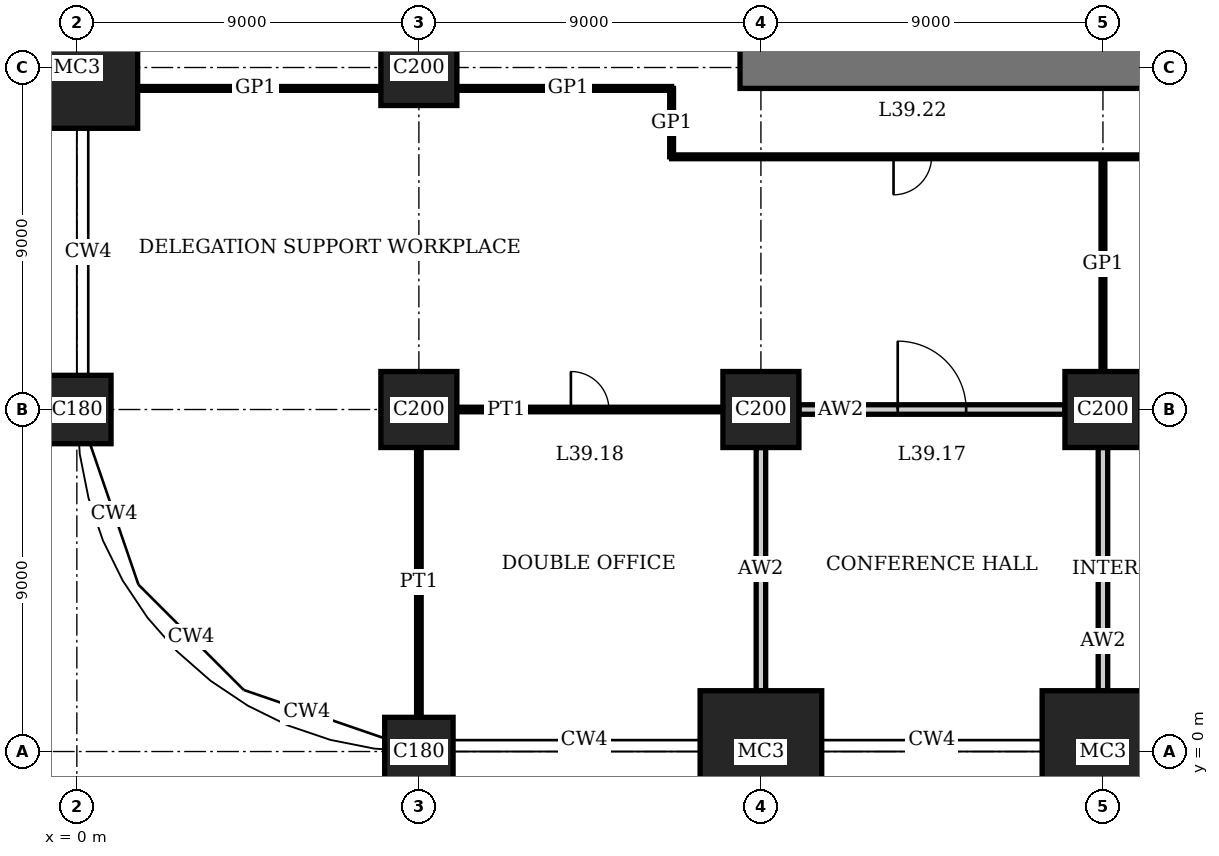
"""IFC4 building model, lengths in metres.
Left out: names, types, materials, properties, quantities, classifications, styles, units other than length and angle.
Written with IfcOpenShell. Run it as: python <this file> out.ifc"""

import sys

from ifc_helpers import new_model, si_unit, direction, frame, frame_2d, origin, origin_2d, place, context, subcontext, project, spatial, rectangle, extrude, element, fill, save


model = new_model("IFC4")
c1 = context("Model", 3, precision=1e-05, world=origin(), true_north=direction((0.0, 1.0)))
c2 = subcontext(c1, "Body", "Model", "MODEL_VIEW")
j1 = project(units=[si_unit("LENGTHUNIT", "METRE"), si_unit("PLANEANGLEUNIT", "RADIAN")], contexts=[c1])
p1 = place(None, origin())
s1 = spatial("IfcSite", under=j1, at=p1, CompositionType="ELEMENT")
p2 = place(p1, origin())
s2 = spatial("IfcBuilding", under=s1, at=p2, CompositionType="ELEMENT")
p3 = place(p2, frame((0.0, 0.0, 162.2)))
s3 = spatial("IfcBuildingStorey", under=s2, at=p3, CompositionType="ELEMENT", Elevation=162.2)
p4 = place(p3, frame((0.0, 9.0, 0.0), z_axis=(0.0, 0.0, 1.0), x_axis=(1.0, 0.0, 0.0)))
e1 = element("IfcColumn", 1, at=p4, inside=s3, PredefinedType="COLUMN", context=c2, shape_type="SweptSolid", body=[
    extrude(rectangle(XDim=1.8, YDim=1.8, at=origin_2d()), origin(), (0.0, 0.0, 1.0), 4.0),
])
p5 = place(p3, frame((0.0, 18.0, 0.0), z_axis=(0.0, 0.0, 1.0), x_axis=(1.0, 0.0, 0.0)))
e2 = element("IfcColumn", 2, at=p5, inside=s3, PredefinedType="COLUMN", context=c2, shape_type="SweptSolid", body=[
    extrude(rectangle(XDim=3.2, YDim=3.2, at=origin_2d()), origin(), (0.0, 0.0, 1.0), 4.0),
])
p6 = place(p3, frame((9.0, 0.0, 0.0), z_axis=(0.0, 0.0, 1.0), x_axis=(1.0, 0.0, 0.0)))
e3 = element("IfcColumn", 3, at=p6, inside=s3, PredefinedType="COLUMN", context=c2, shape_type="SweptSolid", body=[
    extrude(rectangle(XDim=1.8, YDim=1.8, at=origin_2d()), origin(), (0.0, 0.0, 1.0), 4.0),
])
for number, where, z_axis, x_axis in (
    (4, (9.0, 9.0, 0.0), (0.0, 0.0, 1.0), (1.0, 0.0, 0.0)),
    (5, (9.0, 18.0, 0.0), (0.0, 0.0, 1.0), (1.0, 0.0, 0.0)),
):
    element("IfcColumn", number, at=place(p3, frame(where, z_axis=z_axis, x_axis=x_axis)), inside=s3, PredefinedType="COLUMN", context=c2, shape_type="SweptSolid", body=[
        extrude(rectangle(XDim=2.0, YDim=2.0, at=origin_2d()), origin(), (0.0, 0.0, 1.0), 4.0),
    ])
p7 = place(p3, frame((18.0, 0.0, 0.0), z_axis=(0.0, 0.0, 1.0), x_axis=(1.0, 0.0, 0.0)))
e6 = element("IfcColumn", 6, at=p7, inside=s3, PredefinedType="COLUMN", context=c2, shape_type="SweptSolid", body=[
    extrude(rectangle(XDim=3.2, YDim=3.2, at=origin_2d()), origin(), (0.0, 0.0, 1.0), 4.0),
])
p8 = place(p3, frame((18.0, 9.0, 0.0), z_axis=(0.0, 0.0, 1.0), x_axis=(1.0, 0.0, 0.0)))
e7 = element("IfcColumn", 7, at=p8, inside=s3, PredefinedType="COLUMN", context=c2, shape_type="SweptSolid", body=[
    extrude(rectangle(XDim=2.0, YDim=2.0, at=origin_2d()), origin(), (0.0, 0.0, 1.0), 4.0),
])
p9 = place(p3, frame((27.0, 0.0, 0.0), z_axis=(0.0, 0.0, 1.0), x_axis=(1.0, 0.0, 0.0)))
e8 = element("IfcColumn", 8, at=p9, inside=s3, PredefinedType="COLUMN", context=c2, shape_type="SweptSolid", body=[
    extrude(rectangle(XDim=3.2, YDim=3.2, at=origin_2d()), origin(), (0.0, 0.0, 1.0), 4.0),
])
p10 = place(p3, frame((27.0, 9.0, 0.0), z_axis=(0.0, 0.0, 1.0), x_axis=(1.0, 0.0, 0.0)))
e9 = element("IfcColumn", 9, at=p10, inside=s3, PredefinedType="COLUMN", context=c2, shape_type="SweptSolid", body=[
    extrude(rectangle(XDim=2.0, YDim=2.0, at=origin_2d()), origin(), (0.0, 0.0, 1.0), 4.0),
])
p11 = place(p3, frame((17.45, 18.0, 0.0), z_axis=(0.0, 0.0, 1.0), x_axis=(1.0, 0.0, 0.0)))
e10 = element("IfcWall", 10, at=p11, inside=s3, PredefinedType="SHEAR", context=c2, shape_type="SweptSolid", body=[
    extrude(rectangle(XDim=28.1, YDim=1.1, at=frame_2d((14.05, 0.0))), origin(), (0.0, 0.0, 1.0), 4.0),
])
p12 = place(p11, frame((11.55, 0.0, 0.0)))
e11 = element("IfcOpeningElement", 11, at=p12, cuts=e10, PredefinedType="OPENING", context=c2, shape_type="SweptSolid", body=[
    extrude(rectangle(XDim=1.0, YDim=2.4, at=frame_2d((0.5, 1.2))), frame((0.0, 0.56, 0.0), z_axis=(0.0, -1.0, 0.0), x_axis=(1.0, 0.0, 0.0)), (0.0, 0.0, 1.0), 1.12),
])
p13 = place(p11, frame((16.55, 0.0, 0.0)))
e12 = element("IfcOpeningElement", 12, at=p13, cuts=e10, PredefinedType="OPENING", context=c2, shape_type="SweptSolid", body=[
    extrude(rectangle(XDim=1.0, YDim=2.4, at=frame_2d((0.5, 1.2))), frame((0.0, 0.56, 0.0), z_axis=(0.0, -1.0, 0.0), x_axis=(1.0, 0.0, 0.0)), (0.0, 0.0, 1.0), 1.12),
])
p14 = place(p11, frame((20.0, 0.0, 0.0)))
e13 = element("IfcOpeningElement", 13, at=p14, cuts=e10, PredefinedType="OPENING", context=c2, shape_type="SweptSolid", body=[
    extrude(rectangle(XDim=1.1, YDim=2.4, at=frame_2d((0.55, 1.2))), frame((0.0, 0.56, 0.0), z_axis=(0.0, -1.0, 0.0), x_axis=(1.0, 0.0, 0.0)), (0.0, 0.0, 1.0), 1.12),
])
p15 = place(p11, frame((24.05, 0.0, 0.0)))
e14 = element("IfcOpeningElement", 14, at=p15, cuts=e10, PredefinedType="OPENING", context=c2, shape_type="SweptSolid", body=[
    extrude(rectangle(XDim=1.0, YDim=2.4, at=frame_2d((0.5, 1.2))), frame((0.0, 0.56, 0.0), z_axis=(0.0, -1.0, 0.0), x_axis=(1.0, 0.0, 0.0)), (0.0, 0.0, 1.0), 1.12),
])
p16 = place(p3, frame((19.0, 9.0, 0.0), z_axis=(0.0, 0.0, 1.0), x_axis=(1.0, 0.0, 0.0)))
e15 = element("IfcWall", 15, at=p16, inside=s3, PredefinedType="PARTITIONING", context=c2, shape_type="SweptSolid", body=[
    extrude(rectangle(XDim=7.0, YDim=0.25, at=frame_2d((3.5, 0.0))), origin(), (0.0, 0.0, 1.0), 3.05),
])
p17 = place(p16, frame((2.6, 0.0, 0.0)))
e16 = element("IfcOpeningElement", 16, at=p17, cuts=e15, PredefinedType="OPENING", context=c2, shape_type="SweptSolid", body=[
    extrude(rectangle(XDim=1.8, YDim=2.4, at=frame_2d((0.9, 1.2))), frame((0.0, 0.135, 0.0), z_axis=(0.0, -1.0, 0.0), x_axis=(1.0, 0.0, 0.0)), (0.0, 0.0, 1.0), 0.27),
])
p18 = place(p3, frame((10.0, 9.0, 0.0), z_axis=(0.0, 0.0, 1.0), x_axis=(1.0, 0.0, 0.0)))
e17 = element("IfcWall", 17, at=p18, inside=s3, PredefinedType="PARTITIONING", context=c2, shape_type="SweptSolid", body=[
    extrude(rectangle(XDim=7.0, YDim=0.12, at=frame_2d((3.5, 0.0))), origin(), (0.0, 0.0, 1.0), 3.05),
])
p19 = place(p18, frame((3.0, 0.0, 0.0)))
e18 = element("IfcOpeningElement", 18, at=p19, cuts=e17, PredefinedType="OPENING", context=c2, shape_type="SweptSolid", body=[
    extrude(rectangle(XDim=1.0, YDim=2.4, at=frame_2d((0.5, 1.2))), frame((0.0, 0.07, 0.0), z_axis=(0.0, -1.0, 0.0), x_axis=(1.0, 0.0, 0.0)), (0.0, 0.0, 1.0), 0.14),
])
p20 = place(p3, frame((15.65, 15.65, 0.0), z_axis=(0.0, 0.0, 1.0), x_axis=(1.0, 0.0, 0.0)))
e19 = element("IfcWall", 19, at=p20, inside=s3, PredefinedType="PARTITIONING", context=c2, shape_type="SweptSolid", body=[
    extrude(rectangle(XDim=31.7, YDim=0.1, at=frame_2d((15.85, 0.0))), origin(), (0.0, 0.0, 1.0), 3.75),
])
p21 = place(p20, frame((5.84, 0.0, 0.0)))
e20 = element("IfcOpeningElement", 20, at=p21, cuts=e19, PredefinedType="OPENING", context=c2, shape_type="SweptSolid", body=[
    extrude(rectangle(XDim=1.0, YDim=2.4, at=frame_2d((0.5, 1.2))), frame((0.0, 0.06, 0.0), z_axis=(0.0, -1.0, 0.0), x_axis=(1.0, 0.0, 0.0)), (0.0, 0.0, 1.0), 0.12),
])
p22 = place(p20, frame((15.35, 0.0, 0.0)))
e21 = element("IfcOpeningElement", 21, at=p22, cuts=e19, PredefinedType="OPENING", context=c2, shape_type="SweptSolid", body=[
    extrude(rectangle(XDim=1.0, YDim=2.4, at=frame_2d((0.5, 1.2))), frame((0.0, 0.06, 0.0), z_axis=(0.0, -1.0, 0.0), x_axis=(1.0, 0.0, 0.0)), (0.0, 0.0, 1.0), 0.12),
])
p23 = place(p3, frame((1.6, 17.45, 0.0), z_axis=(0.0, 0.0, 1.0), x_axis=(1.0, 0.0, 0.0)))
e22 = element("IfcWall", 22, at=p23, inside=s3, PredefinedType="PARTITIONING", context=c2, shape_type="SweptSolid", body=[
    extrude(rectangle(XDim=6.4, YDim=0.1, at=frame_2d((3.2, 0.0))), origin(), (0.0, 0.0, 1.0), 3.05),
])
p24 = place(p3, frame((10.0, 17.45, 0.0), z_axis=(0.0, 0.0, 1.0), x_axis=(1.0, 0.0, 0.0)))
e23 = element("IfcWall", 23, at=p24, inside=s3, PredefinedType="PARTITIONING", context=c2, shape_type="SweptSolid", body=[
    extrude(rectangle(XDim=5.65, YDim=0.1, at=frame_2d((2.825, 0.0))), origin(), (0.0, 0.0, 1.0), 3.05),
])
p25 = place(p3, frame((9.0, 0.9, 0.0), z_axis=(0.0, 0.0, 1.0), x_axis=(0.0, 1.0, 0.0)))
e24 = element("IfcWall", 24, at=p25, inside=s3, PredefinedType="PARTITIONING", context=c2, shape_type="SweptSolid", body=[
    extrude(rectangle(XDim=7.1, YDim=0.12, at=frame_2d((3.55, 0.0))), origin(), (0.0, 0.0, 1.0), 3.05),
])
p26 = place(p3, frame((15.65, 15.65, 0.0), z_axis=(0.0, 0.0, 1.0), x_axis=(0.0, 1.0, 0.0)))
e25 = element("IfcWall", 25, at=p26, inside=s3, PredefinedType="PARTITIONING", context=c2, shape_type="SweptSolid", body=[
    extrude(rectangle(XDim=1.8, YDim=0.1, at=frame_2d((0.9, 0.0))), origin(), (0.0, 0.0, 1.0), 3.75),
])
for number, where, z_axis, x_axis in (
    (26, (18.0, 1.6, 0.0), (0.0, 0.0, 1.0), (0.0, 1.0, 0.0)),
    (27, (27.0, 1.6, 0.0), (0.0, 0.0, 1.0), (0.0, 1.0, 0.0)),
):
    element("IfcWall", number, at=place(p3, frame(where, z_axis=z_axis, x_axis=x_axis)), inside=s3, PredefinedType="PARTITIONING", context=c2, shape_type="SweptSolid", body=[
        extrude(rectangle(XDim=6.4, YDim=0.25, at=frame_2d((3.2, 0.0))), origin(), (0.0, 0.0, 1.0), 3.05),
    ])
p27 = place(p3, frame((27.0, 10.0, 0.0), z_axis=(0.0, 0.0, 1.0), x_axis=(0.0, 1.0, 0.0)))
e28 = element("IfcWall", 28, at=p27, inside=s3, PredefinedType="PARTITIONING", context=c2, shape_type="SweptSolid", body=[
    extrude(rectangle(XDim=5.65, YDim=0.1, at=frame_2d((2.825, 0.0))), origin(), (0.0, 0.0, 1.0), 3.05),
])
p28 = place(p17, origin())
e29 = element("IfcDoor", 29, at=p28, inside=s3, OperationType="DOUBLE_DOOR_SINGLE_SWING", PredefinedType="DOOR", context=c2, shape_type="SweptSolid", body=[
    extrude(rectangle(XDim=1.8, YDim=2.4, at=frame_2d((0.9, 1.2))), frame((0.0, 0.025, 0.0), z_axis=(0.0, -1.0, 0.0), x_axis=(1.0, 0.0, 0.0)), (0.0, 0.0, 1.0), 0.05),
])
fill(e16, e29)
p29 = place(p19, origin())
e30 = element("IfcDoor", 30, at=p29, inside=s3, OperationType="SINGLE_SWING_RIGHT", PredefinedType="DOOR", context=c2, shape_type="SweptSolid", body=[
    extrude(rectangle(XDim=1.0, YDim=2.4, at=frame_2d((0.5, 1.2))), frame((0.0, 0.025, 0.0), z_axis=(0.0, -1.0, 0.0), x_axis=(1.0, 0.0, 0.0)), (0.0, 0.0, 1.0), 0.05),
])
fill(e18, e30)
p30 = place(p21, origin())
e31 = element("IfcDoor", 31, at=p30, inside=s3, OperationType="SINGLE_SWING_LEFT", PredefinedType="DOOR", context=c2, shape_type="SweptSolid", body=[
    extrude(rectangle(XDim=1.0, YDim=2.4, at=frame_2d((0.5, 1.2))), frame((0.0, 0.02, 0.0), z_axis=(0.0, -1.0, 0.0), x_axis=(1.0, 0.0, 0.0)), (0.0, 0.0, 1.0), 0.04),
])
fill(e20, e31)
save(model, sys.argv[1])
